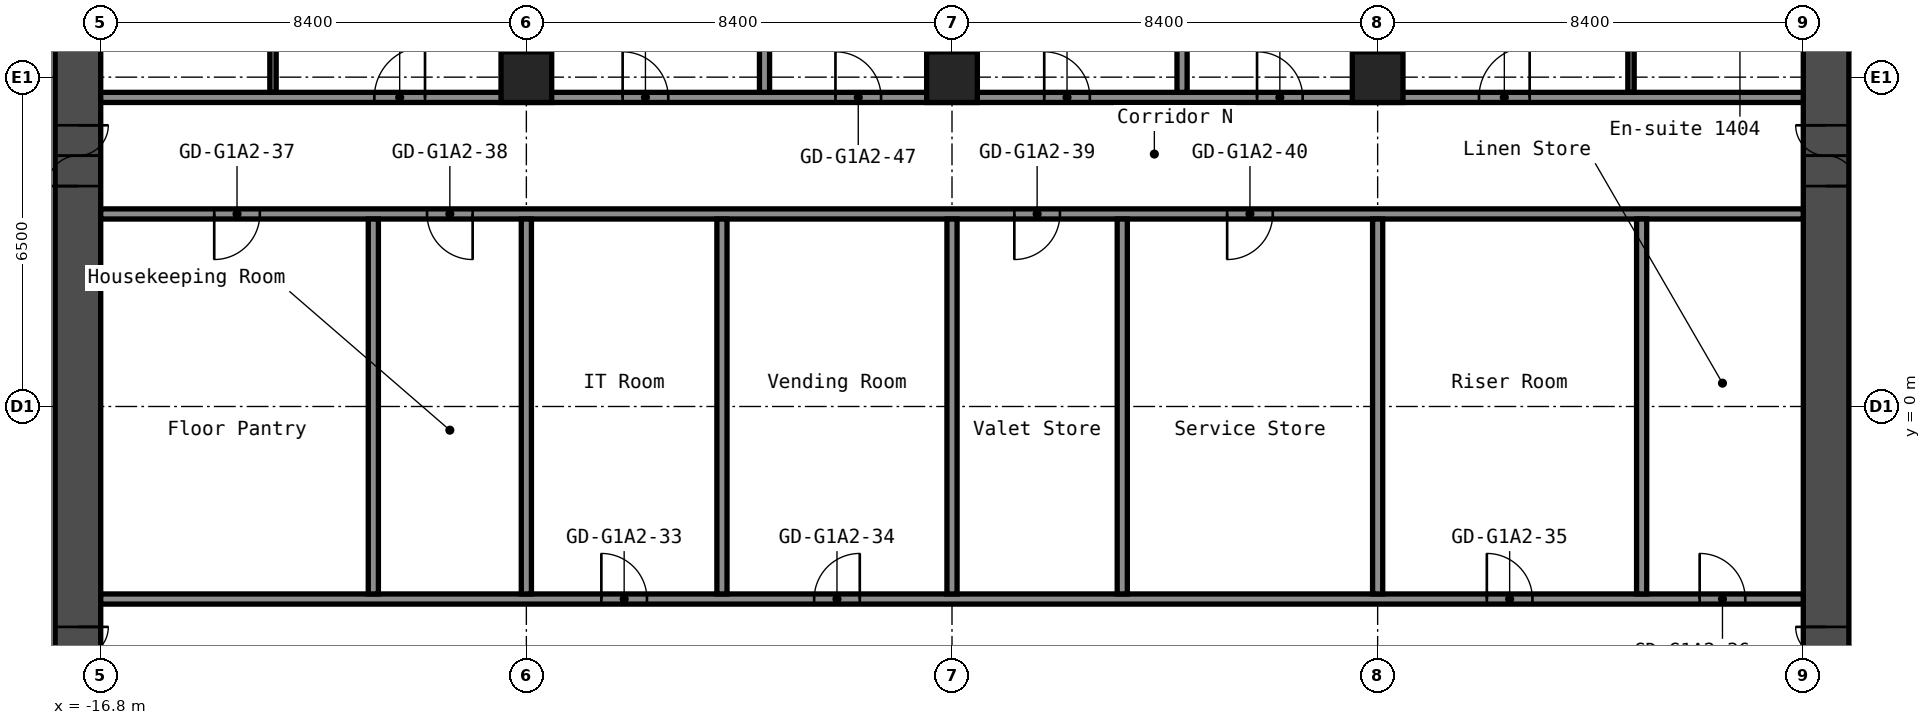
"""IFC4 building model, lengths in metres.
Left out: names, types, materials, properties, quantities, classifications, styles, units other than length and angle.
Written with IfcOpenShell. Run it as: python <this file> out.ifc"""

import sys

from ifc_helpers import new_model, si_unit, direction, frame, frame_2d, origin, origin_2d, place, context, subcontext, project, spatial, rectangle, hollow_rectangle, extrude, element, fill, save


model = new_model("IFC4")
c1 = context("Model", 3, precision=1e-05, world=origin(), true_north=direction((0.0, 1.0)))
c2 = subcontext(c1, "Body", "Model", "MODEL_VIEW")
j1 = project(units=[si_unit("LENGTHUNIT", "METRE"), si_unit("PLANEANGLEUNIT", "RADIAN")], contexts=[c1])
p1 = place(None, origin())
s1 = spatial("IfcSite", under=j1, at=p1, CompositionType="ELEMENT")
p2 = place(p1, origin())
s2 = spatial("IfcBuilding", under=s1, at=p2, CompositionType="ELEMENT")
p3 = place(p2, frame((0.0, 0.0, 51.8)))
s3 = spatial("IfcBuildingStorey", under=s2, at=p3, CompositionType="ELEMENT", Elevation=51.8)
for number, where, z_axis, x_axis in (
    (1, (-8.4, 6.5, 0.0), (0.0, 0.0, 1.0), (1.0, 0.0, 0.0)),
    (2, (0.0, 6.5, 0.0), (0.0, 0.0, 1.0), (1.0, 0.0, 0.0)),
    (3, (8.4, 6.5, 0.0), (0.0, 0.0, 1.0), (1.0, 0.0, 0.0)),
):
    element("IfcColumn", number, at=place(p3, frame(where, z_axis=z_axis, x_axis=x_axis)), inside=s3, PredefinedType="COLUMN", context=c2, shape_type="SweptSolid", body=[
        extrude(hollow_rectangle(XDim=1.0, YDim=1.0, WallThickness=0.04, at=origin_2d()), origin(), (0.0, 0.0, 1.0), 2.8),
    ])
p4 = place(p3, frame((-17.25, -8.4, 0.0), z_axis=(0.0, 0.0, 1.0), x_axis=(0.0, 1.0, 0.0)))
e4 = element("IfcWall", 4, at=p4, inside=s3, PredefinedType="SHEAR", context=c2, shape_type="SweptSolid", body=[
    extrude(rectangle(XDim=16.8, YDim=0.9, at=frame_2d((8.4, 0.0))), origin(), (0.0, 0.0, 1.0), 2.8),
])
p5 = place(p4, frame((12.75, 0.0, 0.0)))
e5 = element("IfcOpeningElement", 5, at=p5, cuts=e4, PredefinedType="OPENING", context=c2, shape_type="SweptSolid", body=[
    extrude(rectangle(XDim=1.2, YDim=2.1, at=frame_2d((0.6, 1.05))), frame((0.0, 0.46, 0.0), z_axis=(0.0, -1.0, 0.0), x_axis=(1.0, 0.0, 0.0)), (0.0, 0.0, 1.0), 0.92),
])
p6 = place(p4, frame((2.85, 0.0, 0.0)))
e6 = element("IfcOpeningElement", 6, at=p6, cuts=e4, PredefinedType="OPENING", context=c2, shape_type="SweptSolid", body=[
    extrude(rectangle(XDim=1.2, YDim=2.1, at=frame_2d((0.6, 1.05))), frame((0.0, 0.46, 0.0), z_axis=(0.0, -1.0, 0.0), x_axis=(1.0, 0.0, 0.0)), (0.0, 0.0, 1.0), 0.92),
])
p7 = place(p3, frame((17.25, -8.4, 0.0), z_axis=(0.0, 0.0, 1.0), x_axis=(0.0, 1.0, 0.0)))
e7 = element("IfcWall", 7, at=p7, inside=s3, PredefinedType="SHEAR", context=c2, shape_type="SweptSolid", body=[
    extrude(rectangle(XDim=16.8, YDim=0.9, at=frame_2d((8.4, 0.0))), origin(), (0.0, 0.0, 1.0), 2.8),
])
p8 = place(p7, frame((12.75, 0.0, 0.0)))
e8 = element("IfcOpeningElement", 8, at=p8, cuts=e7, PredefinedType="OPENING", context=c2, shape_type="SweptSolid", body=[
    extrude(rectangle(XDim=1.2, YDim=2.1, at=frame_2d((0.6, 1.05))), frame((0.0, 0.46, 0.0), z_axis=(0.0, -1.0, 0.0), x_axis=(1.0, 0.0, 0.0)), (0.0, 0.0, 1.0), 0.92),
])
p9 = place(p7, frame((2.85, 0.0, 0.0)))
e9 = element("IfcOpeningElement", 9, at=p9, cuts=e7, PredefinedType="OPENING", context=c2, shape_type="SweptSolid", body=[
    extrude(rectangle(XDim=1.2, YDim=2.1, at=frame_2d((0.6, 1.05))), frame((0.0, 0.46, 0.0), z_axis=(0.0, -1.0, 0.0), x_axis=(1.0, 0.0, 0.0)), (0.0, 0.0, 1.0), 0.92),
])
p10 = place(p3, frame((-16.8, -3.8, 0.0), z_axis=(0.0, 0.0, 1.0), x_axis=(1.0, 0.0, 0.0)))
e10 = element("IfcWall", 10, at=p10, inside=s3, PredefinedType="PARTITIONING", context=c2, shape_type="SweptSolid", body=[
    extrude(rectangle(XDim=33.6, YDim=0.2, at=frame_2d((16.8, 0.0))), origin(), (0.0, 0.0, 1.0), 2.8),
])
p11 = place(p10, frame((9.88, 0.0, 0.0)))
e11 = element("IfcOpeningElement", 11, at=p11, cuts=e10, PredefinedType="OPENING", context=c2, shape_type="SweptSolid", body=[
    extrude(rectangle(XDim=0.9, YDim=2.1, at=frame_2d((0.45, 1.05))), frame((0.0, 0.11, 0.0), z_axis=(0.0, -1.0, 0.0), x_axis=(1.0, 0.0, 0.0)), (0.0, 0.0, 1.0), 0.22),
])
p12 = place(p10, frame((14.08, 0.0, 0.0)))
e12 = element("IfcOpeningElement", 12, at=p12, cuts=e10, PredefinedType="OPENING", context=c2, shape_type="SweptSolid", body=[
    extrude(rectangle(XDim=0.9, YDim=2.1, at=frame_2d((0.45, 1.05))), frame((0.0, 0.11, 0.0), z_axis=(0.0, -1.0, 0.0), x_axis=(1.0, 0.0, 0.0)), (0.0, 0.0, 1.0), 0.22),
])
p13 = place(p10, frame((27.355, 0.0, 0.0)))
e13 = element("IfcOpeningElement", 13, at=p13, cuts=e10, PredefinedType="OPENING", context=c2, shape_type="SweptSolid", body=[
    extrude(rectangle(XDim=0.9, YDim=2.1, at=frame_2d((0.45, 1.05))), frame((0.0, 0.11, 0.0), z_axis=(0.0, -1.0, 0.0), x_axis=(1.0, 0.0, 0.0)), (0.0, 0.0, 1.0), 0.22),
])
p14 = place(p10, frame((31.555, 0.0, 0.0)))
e14 = element("IfcOpeningElement", 14, at=p14, cuts=e10, PredefinedType="OPENING", context=c2, shape_type="SweptSolid", body=[
    extrude(rectangle(XDim=0.9, YDim=2.1, at=frame_2d((0.45, 1.05))), frame((0.0, 0.11, 0.0), z_axis=(0.0, -1.0, 0.0), x_axis=(1.0, 0.0, 0.0)), (0.0, 0.0, 1.0), 0.22),
])
p15 = place(p3, frame((-16.8, 3.8, 0.0), z_axis=(0.0, 0.0, 1.0), x_axis=(1.0, 0.0, 0.0)))
e15 = element("IfcWall", 15, at=p15, inside=s3, PredefinedType="PARTITIONING", context=c2, shape_type="SweptSolid", body=[
    extrude(rectangle(XDim=33.6, YDim=0.2, at=frame_2d((16.8, 0.0))), origin(), (0.0, 0.0, 1.0), 2.8),
])
p16 = place(p15, frame((2.24, 0.0, 0.0)))
e16 = element("IfcOpeningElement", 16, at=p16, cuts=e15, PredefinedType="OPENING", context=c2, shape_type="SweptSolid", body=[
    extrude(rectangle(XDim=0.9, YDim=2.1, at=frame_2d((0.45, 1.05))), frame((0.0, 0.11, 0.0), z_axis=(0.0, -1.0, 0.0), x_axis=(1.0, 0.0, 0.0)), (0.0, 0.0, 1.0), 0.22),
])
p17 = place(p15, frame((6.44, 0.0, 0.0)))
e17 = element("IfcOpeningElement", 17, at=p17, cuts=e15, PredefinedType="OPENING", context=c2, shape_type="SweptSolid", body=[
    extrude(rectangle(XDim=0.9, YDim=2.1, at=frame_2d((0.45, 1.05))), frame((0.0, 0.11, 0.0), z_axis=(0.0, -1.0, 0.0), x_axis=(1.0, 0.0, 0.0)), (0.0, 0.0, 1.0), 0.22),
])
p18 = place(p15, frame((18.03, 0.0, 0.0)))
e18 = element("IfcOpeningElement", 18, at=p18, cuts=e15, PredefinedType="OPENING", context=c2, shape_type="SweptSolid", body=[
    extrude(rectangle(XDim=0.9, YDim=2.1, at=frame_2d((0.45, 1.05))), frame((0.0, 0.11, 0.0), z_axis=(0.0, -1.0, 0.0), x_axis=(1.0, 0.0, 0.0)), (0.0, 0.0, 1.0), 0.22),
])
p19 = place(p15, frame((22.23, 0.0, 0.0)))
e19 = element("IfcOpeningElement", 19, at=p19, cuts=e15, PredefinedType="OPENING", context=c2, shape_type="SweptSolid", body=[
    extrude(rectangle(XDim=0.9, YDim=2.1, at=frame_2d((0.45, 1.05))), frame((0.0, 0.11, 0.0), z_axis=(0.0, -1.0, 0.0), x_axis=(1.0, 0.0, 0.0)), (0.0, 0.0, 1.0), 0.22),
])
p20 = place(p3, frame((-16.8, 6.1, 0.0), z_axis=(0.0, 0.0, 1.0), x_axis=(1.0, 0.0, 0.0)))
e20 = element("IfcWall", 20, at=p20, inside=s3, PredefinedType="PARTITIONING", context=c2, shape_type="SweptSolid", body=[
    extrude(rectangle(XDim=33.6, YDim=0.2, at=frame_2d((16.8, 0.0))), origin(), (0.0, 0.0, 1.0), 2.8),
])
p21 = place(p20, frame((5.4, 0.0, 0.0)))
e21 = element("IfcOpeningElement", 21, at=p21, cuts=e20, PredefinedType="OPENING", context=c2, shape_type="SweptSolid", body=[
    extrude(rectangle(XDim=1.0, YDim=2.1, at=frame_2d((0.5, 1.05))), frame((0.0, 0.11, 0.0), z_axis=(0.0, -1.0, 0.0), x_axis=(1.0, 0.0, 0.0)), (0.0, 0.0, 1.0), 0.22),
])
p22 = place(p20, frame((10.3, 0.0, 0.0)))
e22 = element("IfcOpeningElement", 22, at=p22, cuts=e20, PredefinedType="OPENING", context=c2, shape_type="SweptSolid", body=[
    extrude(rectangle(XDim=0.9, YDim=2.1, at=frame_2d((0.45, 1.05))), frame((0.0, 0.11, 0.0), z_axis=(0.0, -1.0, 0.0), x_axis=(1.0, 0.0, 0.0)), (0.0, 0.0, 1.0), 0.22),
])
p23 = place(p20, frame((14.5, 0.0, 0.0)))
e23 = element("IfcOpeningElement", 23, at=p23, cuts=e20, PredefinedType="OPENING", context=c2, shape_type="SweptSolid", body=[
    extrude(rectangle(XDim=0.9, YDim=2.1, at=frame_2d((0.45, 1.05))), frame((0.0, 0.11, 0.0), z_axis=(0.0, -1.0, 0.0), x_axis=(1.0, 0.0, 0.0)), (0.0, 0.0, 1.0), 0.22),
])
p24 = place(p20, frame((18.62, 0.0, 0.0)))
e24 = element("IfcOpeningElement", 24, at=p24, cuts=e20, PredefinedType="OPENING", context=c2, shape_type="SweptSolid", body=[
    extrude(rectangle(XDim=0.9, YDim=2.1, at=frame_2d((0.45, 1.05))), frame((0.0, 0.11, 0.0), z_axis=(0.0, -1.0, 0.0), x_axis=(1.0, 0.0, 0.0)), (0.0, 0.0, 1.0), 0.22),
])
p25 = place(p20, frame((22.82, 0.0, 0.0)))
e25 = element("IfcOpeningElement", 25, at=p25, cuts=e20, PredefinedType="OPENING", context=c2, shape_type="SweptSolid", body=[
    extrude(rectangle(XDim=0.9, YDim=2.1, at=frame_2d((0.45, 1.05))), frame((0.0, 0.11, 0.0), z_axis=(0.0, -1.0, 0.0), x_axis=(1.0, 0.0, 0.0)), (0.0, 0.0, 1.0), 0.22),
])
p26 = place(p20, frame((27.2, 0.0, 0.0)))
e26 = element("IfcOpeningElement", 26, at=p26, cuts=e20, PredefinedType="OPENING", context=c2, shape_type="SweptSolid", body=[
    extrude(rectangle(XDim=1.0, YDim=2.1, at=frame_2d((0.5, 1.05))), frame((0.0, 0.11, 0.0), z_axis=(0.0, -1.0, 0.0), x_axis=(1.0, 0.0, 0.0)), (0.0, 0.0, 1.0), 0.22),
])
p27 = place(p3, frame((-13.4, 6.2, 0.0), z_axis=(0.0, 0.0, 1.0), x_axis=(0.0, 1.0, 0.0)))
e27 = element("IfcWall", 27, at=p27, inside=s3, PredefinedType="PARTITIONING", context=c2, shape_type="SweptSolid", body=[
    extrude(rectangle(XDim=3.3, YDim=0.125, at=frame_2d((1.65, 0.0))), origin(), (0.0, 0.0, 1.0), 2.8),
])
for number, where, z_axis, x_axis in (
    (28, (-11.42, -3.7, 0.0), (0.0, 0.0, 1.0), (0.0, 1.0, 0.0)),
    (29, (-8.4, -3.7, 0.0), (0.0, 0.0, 1.0), (0.0, 1.0, 0.0)),
):
    element("IfcWall", number, at=place(p3, frame(where, z_axis=z_axis, x_axis=x_axis)), inside=s3, PredefinedType="PARTITIONING", context=c2, shape_type="SweptSolid", body=[
        extrude(rectangle(XDim=7.4, YDim=0.2, at=frame_2d((3.7, 0.0))), origin(), (0.0, 0.0, 1.0), 2.8),
    ])
p28 = place(p3, frame((-8.4, 6.99, 0.0), z_axis=(0.0, 0.0, 1.0), x_axis=(0.0, 1.0, 0.0)))
e30 = element("IfcWall", 30, at=p28, inside=s3, PredefinedType="PARTITIONING", context=c2, shape_type="SweptSolid", body=[
    extrude(rectangle(XDim=13.31, YDim=0.2, at=frame_2d((6.655, 0.0))), origin(), (0.0, 0.0, 1.0), 2.8),
])
p29 = place(p3, frame((-4.54, -3.7, 0.0), z_axis=(0.0, 0.0, 1.0), x_axis=(0.0, 1.0, 0.0)))
e31 = element("IfcWall", 31, at=p29, inside=s3, PredefinedType="PARTITIONING", context=c2, shape_type="SweptSolid", body=[
    extrude(rectangle(XDim=7.4, YDim=0.2, at=frame_2d((3.7, 0.0))), origin(), (0.0, 0.0, 1.0), 2.8),
])
p30 = place(p3, frame((-3.7, 6.2, 0.0), z_axis=(0.0, 0.0, 1.0), x_axis=(0.0, 1.0, 0.0)))
e32 = element("IfcWall", 32, at=p30, inside=s3, PredefinedType="PARTITIONING", context=c2, shape_type="SweptSolid", body=[
    extrude(rectangle(XDim=14.1, YDim=0.2, at=frame_2d((7.05, 0.0))), origin(), (0.0, 0.0, 1.0), 2.8),
])
p31 = place(p3, frame((0.0, -3.7, 0.0), z_axis=(0.0, 0.0, 1.0), x_axis=(0.0, 1.0, 0.0)))
e33 = element("IfcWall", 33, at=p31, inside=s3, PredefinedType="PARTITIONING", context=c2, shape_type="SweptSolid", body=[
    extrude(rectangle(XDim=7.4, YDim=0.2, at=frame_2d((3.7, 0.0))), origin(), (0.0, 0.0, 1.0), 2.8),
])
p32 = place(p3, frame((0.0, 6.99, 0.0), z_axis=(0.0, 0.0, 1.0), x_axis=(0.0, 1.0, 0.0)))
e34 = element("IfcWall", 34, at=p32, inside=s3, PredefinedType="PARTITIONING", context=c2, shape_type="SweptSolid", body=[
    extrude(rectangle(XDim=13.31, YDim=0.2, at=frame_2d((6.655, 0.0))), origin(), (0.0, 0.0, 1.0), 2.8),
])
p33 = place(p3, frame((3.36, -3.7, 0.0), z_axis=(0.0, 0.0, 1.0), x_axis=(0.0, 1.0, 0.0)))
e35 = element("IfcWall", 35, at=p33, inside=s3, PredefinedType="PARTITIONING", context=c2, shape_type="SweptSolid", body=[
    extrude(rectangle(XDim=7.4, YDim=0.2, at=frame_2d((3.7, 0.0))), origin(), (0.0, 0.0, 1.0), 2.8),
])
p34 = place(p3, frame((4.54, 6.2, 0.0), z_axis=(0.0, 0.0, 1.0), x_axis=(0.0, 1.0, 0.0)))
e36 = element("IfcWall", 36, at=p34, inside=s3, PredefinedType="PARTITIONING", context=c2, shape_type="SweptSolid", body=[
    extrude(rectangle(XDim=14.1, YDim=0.2, at=frame_2d((7.05, 0.0))), origin(), (0.0, 0.0, 1.0), 2.8),
])
p35 = place(p3, frame((8.4, -3.7, 0.0), z_axis=(0.0, 0.0, 1.0), x_axis=(0.0, 1.0, 0.0)))
e37 = element("IfcWall", 37, at=p35, inside=s3, PredefinedType="PARTITIONING", context=c2, shape_type="SweptSolid", body=[
    extrude(rectangle(XDim=7.4, YDim=0.2, at=frame_2d((3.7, 0.0))), origin(), (0.0, 0.0, 1.0), 2.8),
])
p36 = place(p3, frame((8.4, 6.99, 0.0), z_axis=(0.0, 0.0, 1.0), x_axis=(0.0, 1.0, 0.0)))
e38 = element("IfcWall", 38, at=p36, inside=s3, PredefinedType="PARTITIONING", context=c2, shape_type="SweptSolid", body=[
    extrude(rectangle(XDim=13.31, YDim=0.2, at=frame_2d((6.655, 0.0))), origin(), (0.0, 0.0, 1.0), 2.8),
])
p37 = place(p3, frame((13.4, 6.2, 0.0), z_axis=(0.0, 0.0, 1.0), x_axis=(0.0, 1.0, 0.0)))
e39 = element("IfcWall", 39, at=p37, inside=s3, PredefinedType="PARTITIONING", context=c2, shape_type="SweptSolid", body=[
    extrude(rectangle(XDim=3.3, YDim=0.125, at=frame_2d((1.65, 0.0))), origin(), (0.0, 0.0, 1.0), 2.8),
])
p38 = place(p3, frame((13.61, -3.7, 0.0), z_axis=(0.0, 0.0, 1.0), x_axis=(0.0, 1.0, 0.0)))
e40 = element("IfcWall", 40, at=p38, inside=s3, PredefinedType="PARTITIONING", context=c2, shape_type="SweptSolid", body=[
    extrude(rectangle(XDim=7.4, YDim=0.2, at=frame_2d((3.7, 0.0))), origin(), (0.0, 0.0, 1.0), 2.8),
])
p39 = place(p5, origin())
e41 = element("IfcDoor", 41, at=p39, inside=s3, OperationType="DOUBLE_DOOR_SINGLE_SWING", PredefinedType="DOOR", context=c2, shape_type="SweptSolid", body=[
    extrude(rectangle(XDim=1.2, YDim=2.1, at=frame_2d((0.6, 1.05))), frame((0.0, 0.025, 0.0), z_axis=(0.0, -1.0, 0.0), x_axis=(1.0, 0.0, 0.0)), (0.0, 0.0, 1.0), 0.05),
])
fill(e5, e41)
p40 = place(p6, origin())
e42 = element("IfcDoor", 42, at=p40, inside=s3, OperationType="DOUBLE_DOOR_SINGLE_SWING", PredefinedType="DOOR", context=c2, shape_type="SweptSolid", body=[
    extrude(rectangle(XDim=1.2, YDim=2.1, at=frame_2d((0.6, 1.05))), frame((0.0, 0.025, 0.0), z_axis=(0.0, -1.0, 0.0), x_axis=(1.0, 0.0, 0.0)), (0.0, 0.0, 1.0), 0.05),
])
fill(e6, e42)
p41 = place(p8, origin())
e43 = element("IfcDoor", 43, at=p41, inside=s3, OperationType="DOUBLE_DOOR_SINGLE_SWING", PredefinedType="DOOR", context=c2, shape_type="SweptSolid", body=[
    extrude(rectangle(XDim=1.2, YDim=2.1, at=frame_2d((0.6, 1.05))), frame((0.0, 0.025, 0.0), z_axis=(0.0, -1.0, 0.0), x_axis=(1.0, 0.0, 0.0)), (0.0, 0.0, 1.0), 0.05),
])
fill(e8, e43)
p42 = place(p9, origin())
e44 = element("IfcDoor", 44, at=p42, inside=s3, OperationType="DOUBLE_DOOR_SINGLE_SWING", PredefinedType="DOOR", context=c2, shape_type="SweptSolid", body=[
    extrude(rectangle(XDim=1.2, YDim=2.1, at=frame_2d((0.6, 1.05))), frame((0.0, 0.025, 0.0), z_axis=(0.0, -1.0, 0.0), x_axis=(1.0, 0.0, 0.0)), (0.0, 0.0, 1.0), 0.05),
])
fill(e9, e44)
p43 = place(p11, origin())
e45 = element("IfcDoor", 45, at=p43, inside=s3, OperationType="SINGLE_SWING_RIGHT", PredefinedType="DOOR", context=c2, shape_type="SweptSolid", body=[
    extrude(rectangle(XDim=0.9, YDim=2.1, at=frame_2d((0.45, 1.05))), frame((0.0, 0.025, 0.0), z_axis=(0.0, -1.0, 0.0), x_axis=(1.0, 0.0, 0.0)), (0.0, 0.0, 1.0), 0.05),
])
fill(e11, e45)
p44 = place(p12, origin())
e46 = element("IfcDoor", 46, at=p44, inside=s3, OperationType="SINGLE_SWING_LEFT", PredefinedType="DOOR", context=c2, shape_type="SweptSolid", body=[
    extrude(rectangle(XDim=0.9, YDim=2.1, at=frame_2d((0.45, 1.05))), frame((0.0, 0.025, 0.0), z_axis=(0.0, -1.0, 0.0), x_axis=(1.0, 0.0, 0.0)), (0.0, 0.0, 1.0), 0.05),
])
fill(e12, e46)
p45 = place(p13, origin())
e47 = element("IfcDoor", 47, at=p45, inside=s3, OperationType="SINGLE_SWING_RIGHT", PredefinedType="DOOR", context=c2, shape_type="SweptSolid", body=[
    extrude(rectangle(XDim=0.9, YDim=2.1, at=frame_2d((0.45, 1.05))), frame((0.0, 0.025, 0.0), z_axis=(0.0, -1.0, 0.0), x_axis=(1.0, 0.0, 0.0)), (0.0, 0.0, 1.0), 0.05),
])
fill(e13, e47)
p46 = place(p14, origin())
e48 = element("IfcDoor", 48, at=p46, inside=s3, OperationType="SINGLE_SWING_RIGHT", PredefinedType="DOOR", context=c2, shape_type="SweptSolid", body=[
    extrude(rectangle(XDim=0.9, YDim=2.1, at=frame_2d((0.45, 1.05))), frame((0.0, 0.025, 0.0), z_axis=(0.0, -1.0, 0.0), x_axis=(1.0, 0.0, 0.0)), (0.0, 0.0, 1.0), 0.05),
])
fill(e14, e48)
p47 = place(p16, origin())
e49 = element("IfcDoor", 49, at=p47, inside=s3, OperationType="SINGLE_SWING_LEFT", PredefinedType="DOOR", context=c2, shape_type="SweptSolid", body=[
    extrude(rectangle(XDim=0.9, YDim=2.1, at=frame_2d((0.45, 1.05))), frame((0.0, 0.025, 0.0), z_axis=(0.0, -1.0, 0.0), x_axis=(1.0, 0.0, 0.0)), (0.0, 0.0, 1.0), 0.05),
])
fill(e16, e49)
p48 = place(p17, origin())
e50 = element("IfcDoor", 50, at=p48, inside=s3, OperationType="SINGLE_SWING_RIGHT", PredefinedType="DOOR", context=c2, shape_type="SweptSolid", body=[
    extrude(rectangle(XDim=0.9, YDim=2.1, at=frame_2d((0.45, 1.05))), frame((0.0, 0.025, 0.0), z_axis=(0.0, -1.0, 0.0), x_axis=(1.0, 0.0, 0.0)), (0.0, 0.0, 1.0), 0.05),
])
fill(e17, e50)
p49 = place(p18, origin())
e51 = element("IfcDoor", 51, at=p49, inside=s3, OperationType="SINGLE_SWING_LEFT", PredefinedType="DOOR", context=c2, shape_type="SweptSolid", body=[
    extrude(rectangle(XDim=0.9, YDim=2.1, at=frame_2d((0.45, 1.05))), frame((0.0, 0.025, 0.0), z_axis=(0.0, -1.0, 0.0), x_axis=(1.0, 0.0, 0.0)), (0.0, 0.0, 1.0), 0.05),
])
fill(e18, e51)
p50 = place(p19, origin())
e52 = element("IfcDoor", 52, at=p50, inside=s3, OperationType="SINGLE_SWING_LEFT", PredefinedType="DOOR", context=c2, shape_type="SweptSolid", body=[
    extrude(rectangle(XDim=0.9, YDim=2.1, at=frame_2d((0.45, 1.05))), frame((0.0, 0.025, 0.0), z_axis=(0.0, -1.0, 0.0), x_axis=(1.0, 0.0, 0.0)), (0.0, 0.0, 1.0), 0.05),
])
fill(e19, e52)
p51 = place(p21, origin())
e53 = element("IfcDoor", 53, at=p51, inside=s3, OperationType="SINGLE_SWING_LEFT", PredefinedType="DOOR", context=c2, shape_type="SweptSolid", body=[
    extrude(rectangle(XDim=1.0, YDim=2.1, at=frame_2d((0.5, 1.05))), frame((0.0, 0.025, 0.0), z_axis=(0.0, -1.0, 0.0), x_axis=(1.0, 0.0, 0.0)), (0.0, 0.0, 1.0), 0.05),
])
fill(e21, e53)
p52 = place(p22, origin())
e54 = element("IfcDoor", 54, at=p52, inside=s3, OperationType="SINGLE_SWING_RIGHT", PredefinedType="DOOR", context=c2, shape_type="SweptSolid", body=[
    extrude(rectangle(XDim=0.9, YDim=2.1, at=frame_2d((0.45, 1.05))), frame((0.0, 0.025, 0.0), z_axis=(0.0, -1.0, 0.0), x_axis=(1.0, 0.0, 0.0)), (0.0, 0.0, 1.0), 0.05),
])
fill(e22, e54)
p53 = place(p23, origin())
e55 = element("IfcDoor", 55, at=p53, inside=s3, OperationType="SINGLE_SWING_RIGHT", PredefinedType="DOOR", context=c2, shape_type="SweptSolid", body=[
    extrude(rectangle(XDim=0.9, YDim=2.1, at=frame_2d((0.45, 1.05))), frame((0.0, 0.025, 0.0), z_axis=(0.0, -1.0, 0.0), x_axis=(1.0, 0.0, 0.0)), (0.0, 0.0, 1.0), 0.05),
])
fill(e23, e55)
p54 = place(p24, origin())
e56 = element("IfcDoor", 56, at=p54, inside=s3, OperationType="SINGLE_SWING_RIGHT", PredefinedType="DOOR", context=c2, shape_type="SweptSolid", body=[
    extrude(rectangle(XDim=0.9, YDim=2.1, at=frame_2d((0.45, 1.05))), frame((0.0, 0.025, 0.0), z_axis=(0.0, -1.0, 0.0), x_axis=(1.0, 0.0, 0.0)), (0.0, 0.0, 1.0), 0.05),
])
fill(e24, e56)
p55 = place(p25, origin())
e57 = element("IfcDoor", 57, at=p55, inside=s3, OperationType="SINGLE_SWING_RIGHT", PredefinedType="DOOR", context=c2, shape_type="SweptSolid", body=[
    extrude(rectangle(XDim=0.9, YDim=2.1, at=frame_2d((0.45, 1.05))), frame((0.0, 0.025, 0.0), z_axis=(0.0, -1.0, 0.0), x_axis=(1.0, 0.0, 0.0)), (0.0, 0.0, 1.0), 0.05),
])
fill(e25, e57)
p56 = place(p26, origin())
e58 = element("IfcDoor", 58, at=p56, inside=s3, OperationType="SINGLE_SWING_LEFT", PredefinedType="DOOR", context=c2, shape_type="SweptSolid", body=[
    extrude(rectangle(XDim=1.0, YDim=2.1, at=frame_2d((0.5, 1.05))), frame((0.0, 0.025, 0.0), z_axis=(0.0, -1.0, 0.0), x_axis=(1.0, 0.0, 0.0)), (0.0, 0.0, 1.0), 0.05),
])
fill(e26, e58)
save(model, sys.argv[1])
